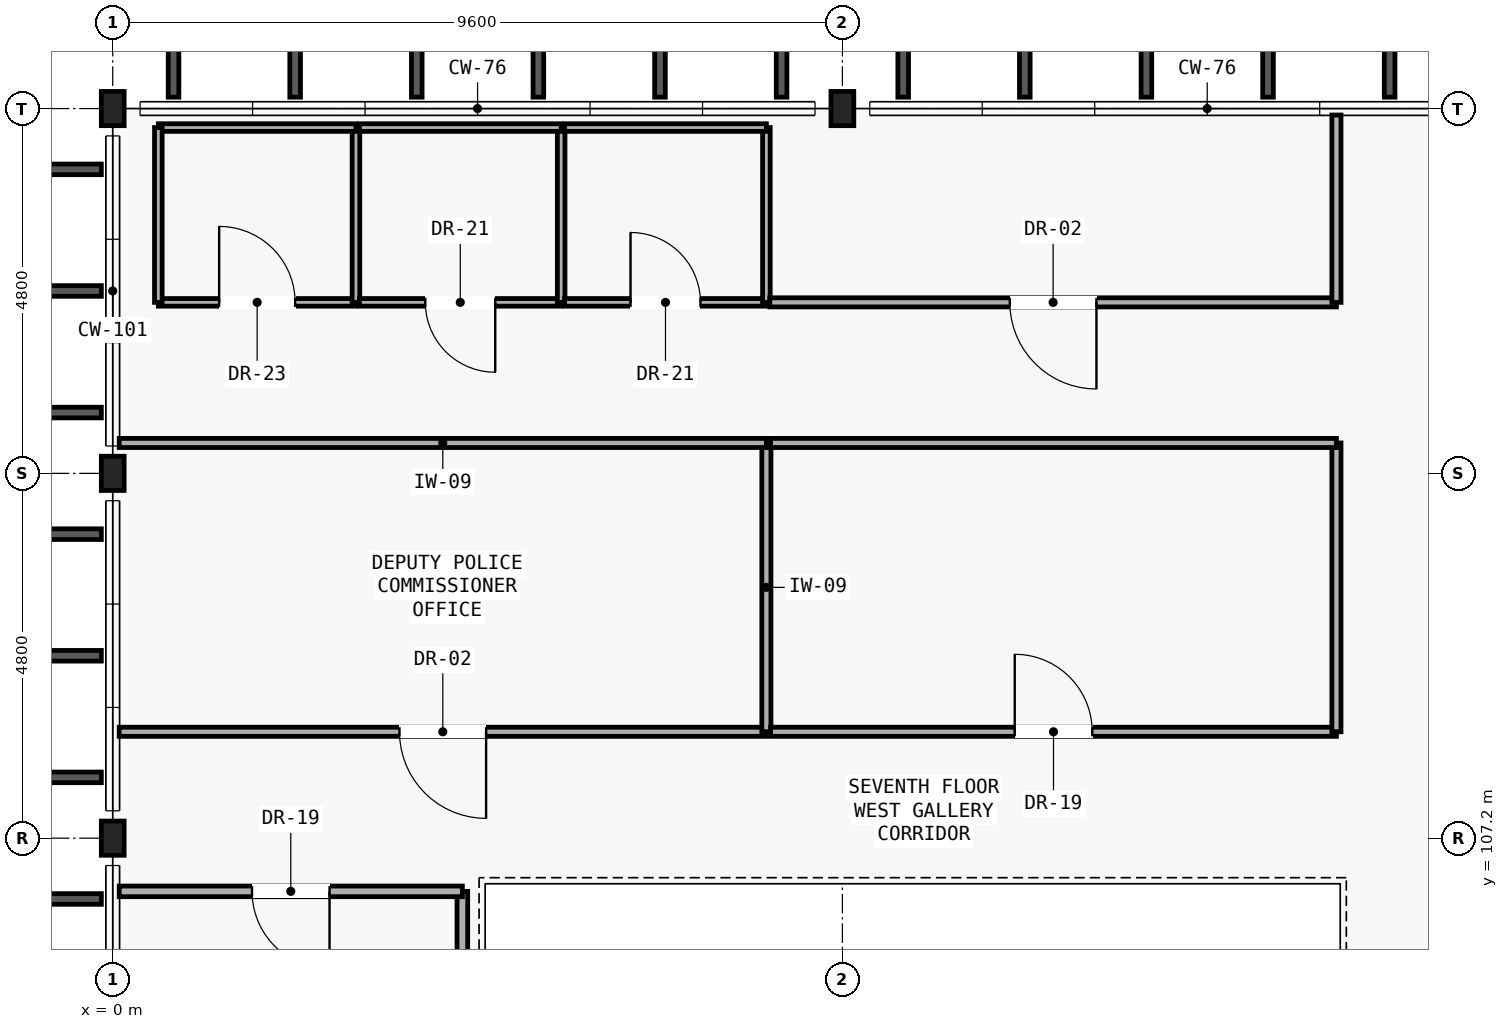
"""IFC4 building model, lengths in metres.
Left out: names, types, materials, properties, quantities, classifications, styles, units other than length and angle.
Written with IfcOpenShell. Run it as: python <this file> out.ifc"""

import sys

from ifc_helpers import new_model, si_unit, direction, frame, frame_2d, origin, origin_2d, place, context, subcontext, project, spatial, rectangle, i_section, extrude, element, fill, save


model = new_model("IFC4")
c1 = context("Model", 3, precision=1e-05, world=origin(), true_north=direction((0.0, 1.0)))
c2 = subcontext(c1, "Body", "Model", "MODEL_VIEW")
j1 = project(units=[si_unit("LENGTHUNIT", "METRE"), si_unit("PLANEANGLEUNIT", "RADIAN")], contexts=[c1])
p1 = place(None, origin())
s1 = spatial("IfcSite", under=j1, at=p1, CompositionType="ELEMENT")
p2 = place(p1, origin())
s2 = spatial("IfcBuilding", under=s1, at=p2, CompositionType="ELEMENT")
p3 = place(p2, frame((0.0, 0.0, 31.15)))
s3 = spatial("IfcBuildingStorey", under=s2, at=p3, CompositionType="ELEMENT", Elevation=31.15)
for number, where, z_axis, x_axis in (
    (1, (0.0, 107.2, 0.0), (0.0, 0.0, 1.0), (1.0, 0.0, 0.0)),
    (2, (0.0, 112.0, 0.0), (0.0, 0.0, 1.0), (1.0, 0.0, 0.0)),
    (3, (0.0, 116.8, 0.0), (0.0, 0.0, 1.0), (1.0, 0.0, 0.0)),
    (4, (9.6, 116.8, 0.0), (0.0, 0.0, 1.0), (1.0, 0.0, 0.0)),
):
    element("IfcColumn", number, at=place(p3, frame(where, z_axis=z_axis, x_axis=x_axis)), inside=s3, PredefinedType="COLUMN", context=c2, shape_type="SweptSolid", body=[
        extrude(i_section(OverallWidth=0.3, OverallDepth=0.45, WebThickness=0.014, FlangeThickness=0.026, FilletRadius=0.027, at=origin_2d()), origin(), (0.0, 0.0, 1.0), 4.9),
    ])
p4 = place(p3, frame((0.6, 114.25, 0.0), z_axis=(0.0, 0.0, 1.0), x_axis=(1.0, 0.0, 0.0)))
e5 = element("IfcWall", 5, at=p4, inside=s3, PredefinedType="PARTITIONING", context=c2, shape_type="SweptSolid", body=[
    extrude(rectangle(XDim=2.6, YDim=0.1, at=frame_2d((1.3, 0.0))), origin(), (0.0, 0.0, 1.0), 4.71),
])
p5 = place(p4, frame((0.8, 0.0, 0.0)))
e6 = element("IfcOpeningElement", 6, at=p5, cuts=e5, PredefinedType="OPENING", context=c2, shape_type="SweptSolid", body=[
    extrude(rectangle(XDim=1.0, YDim=2.08, at=frame_2d((0.5, 1.04))), frame((0.0, 0.06, 0.0), z_axis=(0.0, -1.0, 0.0), x_axis=(1.0, 0.0, 0.0)), (0.0, 0.0, 1.0), 0.12),
])
p6 = place(p3, frame((3.2, 114.25, 0.0), z_axis=(0.0, 0.0, 1.0), x_axis=(0.0, 1.0, 0.0)))
e7 = element("IfcWall", 7, at=p6, inside=s3, PredefinedType="PARTITIONING", context=c2, shape_type="SweptSolid", body=[
    extrude(rectangle(XDim=2.3, YDim=0.1, at=frame_2d((1.15, 0.0))), origin(), (0.0, 0.0, 1.0), 4.71),
])
p7 = place(p3, frame((3.2, 116.55, 0.0), z_axis=(0.0, 0.0, 1.0), x_axis=(-1.0, 0.0, 0.0)))
e8 = element("IfcWall", 8, at=p7, inside=s3, PredefinedType="PARTITIONING", context=c2, shape_type="SweptSolid", body=[
    extrude(rectangle(XDim=2.6, YDim=0.1, at=frame_2d((1.3, 0.0))), origin(), (0.0, 0.0, 1.0), 3.89),
])
p8 = place(p3, frame((0.6, 116.55, 0.0), z_axis=(0.0, 0.0, 1.0), x_axis=(0.0, -1.0, 0.0)))
e9 = element("IfcWall", 9, at=p8, inside=s3, PredefinedType="PARTITIONING", context=c2, shape_type="SweptSolid", body=[
    extrude(rectangle(XDim=2.3, YDim=0.1, at=frame_2d((1.15, 0.0))), origin(), (0.0, 0.0, 1.0), 4.71),
])
p9 = place(p3, frame((3.245, 114.25, 0.0), z_axis=(0.0, 0.0, 1.0), x_axis=(1.0, 0.0, 0.0)))
e10 = element("IfcWall", 10, at=p9, inside=s3, PredefinedType="PARTITIONING", context=c2, shape_type="SweptSolid", body=[
    extrude(rectangle(XDim=2.655, YDim=0.1, at=frame_2d((1.327, 0.0))), origin(), (0.0, 0.0, 1.0), 4.71),
])
p10 = place(p9, frame((0.867, 0.0, 0.0)))
e11 = element("IfcOpeningElement", 11, at=p10, cuts=e10, PredefinedType="OPENING", context=c2, shape_type="SweptSolid", body=[
    extrude(rectangle(XDim=0.92, YDim=2.08, at=frame_2d((0.46, 1.04))), frame((0.0, 0.06, 0.0), z_axis=(0.0, -1.0, 0.0), x_axis=(1.0, 0.0, 0.0)), (0.0, 0.0, 1.0), 0.12),
])
p11 = place(p3, frame((5.9, 114.25, 0.0), z_axis=(0.0, 0.0, 1.0), x_axis=(0.0, 1.0, 0.0)))
e12 = element("IfcWall", 12, at=p11, inside=s3, PredefinedType="PARTITIONING", context=c2, shape_type="SweptSolid", body=[
    extrude(rectangle(XDim=2.3, YDim=0.1, at=frame_2d((1.15, 0.0))), origin(), (0.0, 0.0, 1.0), 4.71),
])
p12 = place(p3, frame((5.9, 116.55, 0.0), z_axis=(0.0, 0.0, 1.0), x_axis=(-1.0, 0.0, 0.0)))
e13 = element("IfcWall", 13, at=p12, inside=s3, PredefinedType="PARTITIONING", context=c2, shape_type="SweptSolid", body=[
    extrude(rectangle(XDim=2.655, YDim=0.1, at=frame_2d((1.327, 0.0))), origin(), (0.0, 0.0, 1.0), 3.89),
])
p13 = place(p3, frame((5.945, 114.25, 0.0), z_axis=(0.0, 0.0, 1.0), x_axis=(1.0, 0.0, 0.0)))
e14 = element("IfcWall", 14, at=p13, inside=s3, PredefinedType="PARTITIONING", context=c2, shape_type="SweptSolid", body=[
    extrude(rectangle(XDim=2.655, YDim=0.1, at=frame_2d((1.328, 0.0))), origin(), (0.0, 0.0, 1.0), 4.71),
])
p14 = place(p13, frame((0.867, 0.0, 0.0)))
e15 = element("IfcOpeningElement", 15, at=p14, cuts=e14, PredefinedType="OPENING", context=c2, shape_type="SweptSolid", body=[
    extrude(rectangle(XDim=0.92, YDim=2.08, at=frame_2d((0.46, 1.04))), frame((0.0, 0.06, 0.0), z_axis=(0.0, -1.0, 0.0), x_axis=(1.0, 0.0, 0.0)), (0.0, 0.0, 1.0), 0.12),
])
p15 = place(p3, frame((8.6, 114.25, 0.0), z_axis=(0.0, 0.0, 1.0), x_axis=(0.0, 1.0, 0.0)))
e16 = element("IfcWall", 16, at=p15, inside=s3, PredefinedType="PARTITIONING", context=c2, shape_type="SweptSolid", body=[
    extrude(rectangle(XDim=2.3, YDim=0.1, at=frame_2d((1.15, 0.0))), origin(), (0.0, 0.0, 1.0), 4.71),
])
p16 = place(p3, frame((8.6, 116.55, 0.0), z_axis=(0.0, 0.0, 1.0), x_axis=(-1.0, 0.0, 0.0)))
e17 = element("IfcWall", 17, at=p16, inside=s3, PredefinedType="PARTITIONING", context=c2, shape_type="SweptSolid", body=[
    extrude(rectangle(XDim=2.655, YDim=0.1, at=frame_2d((1.328, 0.0))), origin(), (0.0, 0.0, 1.0), 3.89),
])
p17 = place(p3, frame((8.645, 114.25, 0.0), z_axis=(0.0, 0.0, 1.0), x_axis=(1.0, 0.0, 0.0)))
e18 = element("IfcWall", 18, at=p17, inside=s3, PredefinedType="PARTITIONING", context=c2, shape_type="SweptSolid", body=[
    extrude(rectangle(XDim=7.455, YDim=0.12, at=frame_2d((3.728, 0.0))), origin(), (0.0, 0.0, 1.0), 4.71),
])
p18 = place(p17, frame((3.157, 0.0, 0.0)))
e19 = element("IfcOpeningElement", 19, at=p18, cuts=e18, PredefinedType="OPENING", context=c2, shape_type="SweptSolid", body=[
    extrude(rectangle(XDim=1.14, YDim=2.15, at=frame_2d((0.57, 1.075))), frame((0.0, 0.07, 0.0), z_axis=(0.0, -1.0, 0.0), x_axis=(1.0, 0.0, 0.0)), (0.0, 0.0, 1.0), 0.14),
])
p19 = place(p3, frame((16.1, 114.25, 0.0), z_axis=(0.0, 0.0, 1.0), x_axis=(0.0, 1.0, 0.0)))
e20 = element("IfcWall", 20, at=p19, inside=s3, PredefinedType="PARTITIONING", context=c2, shape_type="SweptSolid", body=[
    extrude(rectangle(XDim=2.465, YDim=0.12, at=frame_2d((1.232, 0.0))), origin(), (0.0, 0.0, 1.0), 4.71),
])
p20 = place(p3, frame((4.6, 88.885, 0.0), z_axis=(0.0, 0.0, 1.0), x_axis=(0.0, 1.0, 0.0)))
e21 = element("IfcWall", 21, at=p20, inside=s3, PredefinedType="PARTITIONING", context=c2, shape_type="SweptSolid", body=[
    extrude(rectangle(XDim=17.615, YDim=0.14, at=frame_2d((8.808, 0.0))), origin(), (0.0, 0.0, 1.0), 4.71),
])
p21 = place(p3, frame((4.6, 106.5, 0.0), z_axis=(0.0, 0.0, 1.0), x_axis=(-1.0, 0.0, 0.0)))
e22 = element("IfcWall", 22, at=p21, inside=s3, PredefinedType="PARTITIONING", context=c2, shape_type="SweptSolid", body=[
    extrude(rectangle(XDim=4.515, YDim=0.14, at=frame_2d((2.258, 0.0))), origin(), (0.0, 0.0, 1.0), 4.71),
])
p22 = place(p21, frame((1.748, 0.0, 0.0)))
e23 = element("IfcOpeningElement", 23, at=p22, cuts=e22, PredefinedType="OPENING", context=c2, shape_type="SweptSolid", body=[
    extrude(rectangle(XDim=1.02, YDim=2.1, at=frame_2d((0.51, 1.05))), frame((0.0, 0.08, 0.0), z_axis=(0.0, -1.0, 0.0), x_axis=(1.0, 0.0, 0.0)), (0.0, 0.0, 1.0), 0.16),
])
p23 = place(p3, frame((0.085, 108.6, 0.0), z_axis=(0.0, 0.0, 1.0), x_axis=(1.0, 0.0, 0.0)))
e24 = element("IfcWall", 24, at=p23, inside=s3, PredefinedType="PARTITIONING", context=c2, shape_type="SweptSolid", body=[
    extrude(rectangle(XDim=8.515, YDim=0.12, at=frame_2d((4.258, 0.0))), origin(), (0.0, 0.0, 1.0), 4.71),
])
p24 = place(p23, frame((3.688, 0.0, 0.0)))
e25 = element("IfcOpeningElement", 25, at=p24, cuts=e24, PredefinedType="OPENING", context=c2, shape_type="SweptSolid", body=[
    extrude(rectangle(XDim=1.14, YDim=2.15, at=frame_2d((0.57, 1.075))), frame((0.0, 0.07, 0.0), z_axis=(0.0, -1.0, 0.0), x_axis=(1.0, 0.0, 0.0)), (0.0, 0.0, 1.0), 0.14),
])
p25 = place(p3, frame((8.6, 108.6, 0.0), z_axis=(0.0, 0.0, 1.0), x_axis=(0.0, 1.0, 0.0)))
e26 = element("IfcWall", 26, at=p25, inside=s3, PredefinedType="PARTITIONING", context=c2, shape_type="SweptSolid", body=[
    extrude(rectangle(XDim=3.8, YDim=0.12, at=frame_2d((1.9, 0.0))), origin(), (0.0, 0.0, 1.0), 4.71),
])
p26 = place(p3, frame((8.6, 112.4, 0.0), z_axis=(0.0, 0.0, 1.0), x_axis=(-1.0, 0.0, 0.0)))
e27 = element("IfcWall", 27, at=p26, inside=s3, PredefinedType="PARTITIONING", context=c2, shape_type="SweptSolid", body=[
    extrude(rectangle(XDim=8.515, YDim=0.12, at=frame_2d((4.258, 0.0))), origin(), (0.0, 0.0, 1.0), 4.71),
])
p27 = place(p3, frame((8.655, 108.6, 0.0), z_axis=(0.0, 0.0, 1.0), x_axis=(1.0, 0.0, 0.0)))
e28 = element("IfcWall", 28, at=p27, inside=s3, PredefinedType="PARTITIONING", context=c2, shape_type="SweptSolid", body=[
    extrude(rectangle(XDim=7.445, YDim=0.12, at=frame_2d((3.723, 0.0))), origin(), (0.0, 0.0, 1.0), 4.71),
])
p28 = place(p27, frame((3.212, 0.0, 0.0)))
e29 = element("IfcOpeningElement", 29, at=p28, cuts=e28, PredefinedType="OPENING", context=c2, shape_type="SweptSolid", body=[
    extrude(rectangle(XDim=1.02, YDim=2.1, at=frame_2d((0.51, 1.05))), frame((0.0, 0.07, 0.0), z_axis=(0.0, -1.0, 0.0), x_axis=(1.0, 0.0, 0.0)), (0.0, 0.0, 1.0), 0.14),
])
p29 = place(p3, frame((16.1, 108.6, 0.0), z_axis=(0.0, 0.0, 1.0), x_axis=(0.0, 1.0, 0.0)))
e30 = element("IfcWall", 30, at=p29, inside=s3, PredefinedType="PARTITIONING", context=c2, shape_type="SweptSolid", body=[
    extrude(rectangle(XDim=3.8, YDim=0.12, at=frame_2d((1.9, 0.0))), origin(), (0.0, 0.0, 1.0), 4.71),
])
p30 = place(p3, frame((16.1, 112.4, 0.0), z_axis=(0.0, 0.0, 1.0), x_axis=(-1.0, 0.0, 0.0)))
e31 = element("IfcWall", 31, at=p30, inside=s3, PredefinedType="PARTITIONING", context=c2, shape_type="SweptSolid", body=[
    extrude(rectangle(XDim=7.445, YDim=0.12, at=frame_2d((3.723, 0.0))), origin(), (0.0, 0.0, 1.0), 4.71),
])
p31 = place(p5, origin())
e32 = element("IfcDoor", 32, at=p31, inside=s3, OperationType="SINGLE_SWING_LEFT", PredefinedType="DOOR", context=c2, shape_type="SweptSolid", body=[
    extrude(rectangle(XDim=1.0, YDim=2.08, at=frame_2d((0.5, 1.04))), frame((0.0, 0.025, 0.0), z_axis=(0.0, -1.0, 0.0), x_axis=(1.0, 0.0, 0.0)), (0.0, 0.0, 1.0), 0.05),
])
fill(e6, e32)
p32 = place(p10, frame((0.92, 0.0, 0.0), z_axis=(0.0, 0.0, 1.0), x_axis=(-1.0, 0.0, 0.0)))
e33 = element("IfcDoor", 33, at=p32, inside=s3, OperationType="SINGLE_SWING_RIGHT", PredefinedType="DOOR", context=c2, shape_type="SweptSolid", body=[
    extrude(rectangle(XDim=0.92, YDim=2.08, at=frame_2d((0.46, 1.04))), frame((0.0, 0.025, 0.0), z_axis=(0.0, -1.0, 0.0), x_axis=(1.0, 0.0, 0.0)), (0.0, 0.0, 1.0), 0.05),
])
fill(e11, e33)
p33 = place(p14, origin())
e34 = element("IfcDoor", 34, at=p33, inside=s3, OperationType="SINGLE_SWING_LEFT", PredefinedType="DOOR", context=c2, shape_type="SweptSolid", body=[
    extrude(rectangle(XDim=0.92, YDim=2.08, at=frame_2d((0.46, 1.04))), frame((0.0, 0.025, 0.0), z_axis=(0.0, -1.0, 0.0), x_axis=(1.0, 0.0, 0.0)), (0.0, 0.0, 1.0), 0.05),
])
fill(e15, e34)
p34 = place(p18, frame((1.14, 0.0, 0.0), z_axis=(0.0, 0.0, 1.0), x_axis=(-1.0, 0.0, 0.0)))
e35 = element("IfcDoor", 35, at=p34, inside=s3, OperationType="SINGLE_SWING_RIGHT", PredefinedType="DOOR", context=c2, shape_type="SweptSolid", body=[
    extrude(rectangle(XDim=1.14, YDim=2.15, at=frame_2d((0.57, 1.075))), frame((0.0, 0.025, 0.0), z_axis=(0.0, -1.0, 0.0), x_axis=(1.0, 0.0, 0.0)), (0.0, 0.0, 1.0), 0.05),
])
fill(e19, e35)
p35 = place(p22, origin())
e36 = element("IfcDoor", 36, at=p35, inside=s3, OperationType="SINGLE_SWING_LEFT", PredefinedType="DOOR", context=c2, shape_type="SweptSolid", body=[
    extrude(rectangle(XDim=1.02, YDim=2.1, at=frame_2d((0.51, 1.05))), frame((0.0, 0.025, 0.0), z_axis=(0.0, -1.0, 0.0), x_axis=(1.0, 0.0, 0.0)), (0.0, 0.0, 1.0), 0.05),
])
fill(e23, e36)
p36 = place(p24, frame((1.14, 0.0, 0.0), z_axis=(0.0, 0.0, 1.0), x_axis=(-1.0, 0.0, 0.0)))
e37 = element("IfcDoor", 37, at=p36, inside=s3, OperationType="SINGLE_SWING_RIGHT", PredefinedType="DOOR", context=c2, shape_type="SweptSolid", body=[
    extrude(rectangle(XDim=1.14, YDim=2.15, at=frame_2d((0.57, 1.075))), frame((0.0, 0.025, 0.0), z_axis=(0.0, -1.0, 0.0), x_axis=(1.0, 0.0, 0.0)), (0.0, 0.0, 1.0), 0.05),
])
fill(e25, e37)
p37 = place(p28, origin())
e38 = element("IfcDoor", 38, at=p37, inside=s3, OperationType="SINGLE_SWING_LEFT", PredefinedType="DOOR", context=c2, shape_type="SweptSolid", body=[
    extrude(rectangle(XDim=1.02, YDim=2.1, at=frame_2d((0.51, 1.05))), frame((0.0, 0.025, 0.0), z_axis=(0.0, -1.0, 0.0), x_axis=(1.0, 0.0, 0.0)), (0.0, 0.0, 1.0), 0.05),
])
fill(e29, e38)
save(model, sys.argv[1])
